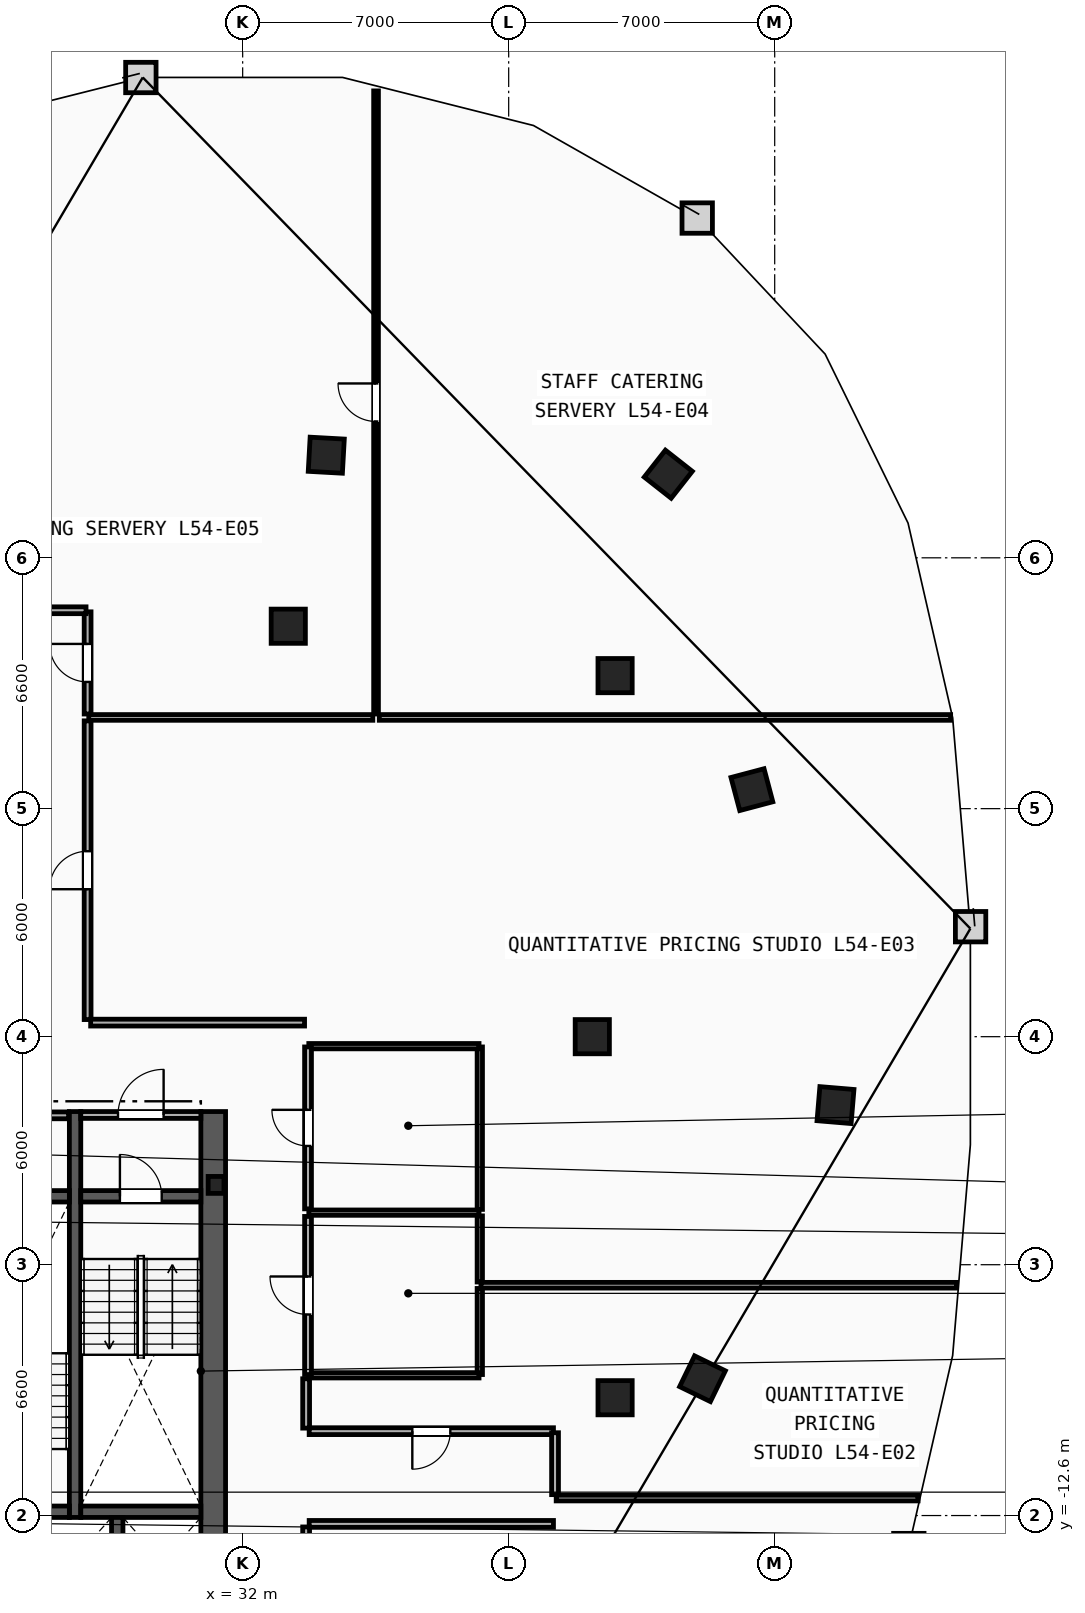
"""IFC4 building model, lengths in metres.
Left out: names, types, materials, properties, quantities, classifications, styles, units other than length and angle.
Written with IfcOpenShell. Run it as: python <this file> out.ifc"""

import sys

from ifc_helpers import new_model, si_unit, direction, frame, frame_2d, origin, origin_2d, place, context, subcontext, project, spatial, rectangle, i_section, extrude, element, fill, save


model = new_model("IFC4")
c1 = context("Model", 3, precision=1e-05, world=origin(), true_north=direction((0.0, 1.0)))
c2 = subcontext(c1, "Body", "Model", "MODEL_VIEW")
j1 = project(units=[si_unit("LENGTHUNIT", "METRE"), si_unit("PLANEANGLEUNIT", "RADIAN")], contexts=[c1])
p1 = place(None, origin())
s1 = spatial("IfcSite", under=j1, at=p1, CompositionType="ELEMENT")
p2 = place(p1, origin())
s2 = spatial("IfcBuilding", under=s1, at=p2, CompositionType="ELEMENT")
p3 = place(p2, frame((0.0, 0.0, 206.2)))
s3 = spatial("IfcBuildingStorey", under=s2, at=p3, CompositionType="ELEMENT", Elevation=206.2)
p4 = place(p3, frame((31.3, -3.9, 0.0), z_axis=(0.0, 0.0, 1.0), x_axis=(1.0, 0.0, 0.0)))
e1 = element("IfcColumn", 1, at=p4, inside=s3, PredefinedType="COLUMN", context=c2, shape_type="SweptSolid", body=[
    extrude(i_section(OverallWidth=0.416, OverallDepth=0.446, WebThickness=0.039, FlangeThickness=0.063, FilletRadius=0.018, at=origin_2d()), origin(), (0.0, 0.0, 1.0), 3.6),
])
for number, where, z_axis, x_axis in (
    (2, (41.2, 0.0, 0.0), (0.0, 0.0, 1.0), (1.0, 0.0, 0.0)),
    (3, (41.8, -9.5, 0.0), (0.0, 0.0, 1.0), (1.0, 0.0, 0.0)),
    (4, (41.8, 9.5, 0.0), (0.0, 0.0, 1.0), (1.0, 0.0, 0.0)),
    (5, (33.2, 10.8, 0.0), (0.0, 0.0, 1.0), (1.0, 0.0, 0.0)),
    (6, (44.1, -9.0, 0.0), (0.0, 0.0, 1.0), (0.437, 0.899, 0.0)),
    (7, (47.6, -1.8, 0.0), (0.0, 0.0, 1.0), (0.084, 0.997, 0.0)),
    (8, (45.4, 6.5, 0.0), (0.0, 0.0, 1.0), (-0.256, 0.967, 0.0)),
    (9, (43.2, 14.8, 0.0), (0.0, 0.0, 1.0), (-0.786, 0.618, 0.0)),
    (10, (34.2, 15.3, 0.0), (0.0, 0.0, 1.0), (-0.998, 0.055, 0.0)),
):
    element("IfcColumn", number, at=place(p3, frame(where, z_axis=z_axis, x_axis=x_axis)), inside=s3, PredefinedType="COLUMN", context=c2, shape_type="SweptSolid", body=[
        extrude(rectangle(XDim=0.9, YDim=0.9, at=origin_2d()), origin(), (0.0, 0.0, 1.0), 3.6),
    ])
p5 = place(p3, frame((31.225, -15.3, 0.0), z_axis=(0.0, 0.0, 1.0), x_axis=(0.0, 1.0, 0.0)))
e11 = element("IfcWall", 11, at=p5, inside=s3, PredefinedType="SHEAR", context=c2, shape_type="SweptSolid", body=[
    extrude(rectangle(XDim=13.33, YDim=0.65, at=frame_2d((6.665, 0.0))), origin(), (0.0, 0.0, 1.0), 3.34),
])
p6 = place(p3, frame((27.59, -12.65, 0.0), z_axis=(0.0, 0.0, 1.0), x_axis=(0.0, 1.0, 0.0)))
e12 = element("IfcWall", 12, at=p6, inside=s3, PredefinedType="SHEAR", context=c2, shape_type="SweptSolid", body=[
    extrude(rectangle(XDim=10.68, YDim=0.3, at=frame_2d((5.34, 0.0))), origin(), (0.0, 0.0, 1.0), 3.34),
])
p7 = place(p3, frame((27.74, -4.2, 0.0), z_axis=(0.0, 0.0, 1.0), x_axis=(1.0, 0.0, 0.0)))
e13 = element("IfcWall", 13, at=p7, inside=s3, PredefinedType="SHEAR", context=c2, shape_type="SweptSolid", body=[
    extrude(rectangle(XDim=3.16, YDim=0.3, at=frame_2d((1.58, 0.0))), origin(), (0.0, 0.0, 1.0), 3.34),
])
p8 = place(p7, frame((1.03, 0.0, 0.0)))
e14 = element("IfcOpeningElement", 14, at=p8, cuts=e13, PredefinedType="OPENING", context=c2, shape_type="SweptSolid", body=[
    extrude(rectangle(XDim=1.1, YDim=2.15, at=frame_2d((0.55, 1.075))), frame((0.0, 0.16, 0.0), z_axis=(0.0, -1.0, 0.0), x_axis=(1.0, 0.0, 0.0)), (0.0, 0.0, 1.0), 0.32),
])
p9 = place(p3, frame((27.74, -12.5, 0.0), z_axis=(0.0, 0.0, 1.0), x_axis=(1.0, 0.0, 0.0)))
e15 = element("IfcWall", 15, at=p9, inside=s3, PredefinedType="SHEAR", context=c2, shape_type="SweptSolid", body=[
    extrude(rectangle(XDim=3.16, YDim=0.3, at=frame_2d((1.58, 0.0))), origin(), (0.0, 0.0, 1.0), 3.34),
])
p10 = place(p3, frame((24.28, -12.5, 0.0), z_axis=(0.0, 0.0, 1.0), x_axis=(1.0, 0.0, 0.0)))
e16 = element("IfcWall", 16, at=p10, inside=s3, PredefinedType="SHEAR", context=c2, shape_type="SweptSolid", body=[
    extrude(rectangle(XDim=3.16, YDim=0.3, at=frame_2d((1.58, 0.0))), origin(), (0.0, 0.0, 1.0), 3.34),
])
p11 = place(p10, frame((1.03, 0.0, 0.0)))
e17 = element("IfcOpeningElement", 17, at=p11, cuts=e16, PredefinedType="OPENING", context=c2, shape_type="SweptSolid", body=[
    extrude(rectangle(XDim=1.1, YDim=2.15, at=frame_2d((0.55, 1.075))), frame((0.0, 0.16, 0.0), z_axis=(0.0, -1.0, 0.0), x_axis=(1.0, 0.0, 0.0)), (0.0, 0.0, 1.0), 0.32),
])
p12 = place(p3, frame((24.28, -4.2, 0.0), z_axis=(0.0, 0.0, 1.0), x_axis=(1.0, 0.0, 0.0)))
e18 = element("IfcWall", 18, at=p12, inside=s3, PredefinedType="SHEAR", context=c2, shape_type="SweptSolid", body=[
    extrude(rectangle(XDim=3.16, YDim=0.3, at=frame_2d((1.58, 0.0))), origin(), (0.0, 0.0, 1.0), 3.34),
])
p13 = place(p3, frame((27.74, -2.06, 0.0), z_axis=(0.0, 0.0, 1.0), x_axis=(1.0, 0.0, 0.0)))
e19 = element("IfcWall", 19, at=p13, inside=s3, PredefinedType="PARTITIONING", context=c2, shape_type="SweptSolid", body=[
    extrude(rectangle(XDim=3.16, YDim=0.18, at=frame_2d((1.58, 0.0))), origin(), (0.0, 0.0, 1.0), 3.34),
])
p14 = place(p13, frame((0.98, 0.0, 0.0)))
e20 = element("IfcOpeningElement", 20, at=p14, cuts=e19, PredefinedType="OPENING", context=c2, shape_type="SweptSolid", body=[
    extrude(rectangle(XDim=1.2, YDim=2.15, at=frame_2d((0.6, 1.075))), frame((0.0, 0.1, 0.0), z_axis=(0.0, -1.0, 0.0), x_axis=(1.0, 0.0, 0.0)), (0.0, 0.0, 1.0), 0.2),
])
p15 = place(p3, frame((28.7, -14.95, 0.0), z_axis=(0.0, 0.0, 1.0), x_axis=(0.0, 1.0, 0.0)))
e21 = element("IfcWall", 21, at=p15, inside=s3, PredefinedType="SHEAR", context=c2, shape_type="SweptSolid", body=[
    extrude(rectangle(XDim=2.3, YDim=0.3, at=frame_2d((1.15, 0.0))), origin(), (0.0, 0.0, 1.0), 3.34),
])
p16 = place(p3, frame((24.3, -2.07, 0.0), z_axis=(0.0, 0.0, 1.0), x_axis=(1.0, 0.0, 0.0)))
e22 = element("IfcWall", 22, at=p16, inside=s3, PredefinedType="PARTITIONING", context=c2, shape_type="SweptSolid", body=[
    extrude(rectangle(XDim=3.12, YDim=0.18, at=frame_2d((1.56, 0.0))), origin(), (0.0, 0.0, 1.0), 3.34),
])
p17 = place(p16, frame((1.085, 0.0, 0.0)))
e23 = element("IfcOpeningElement", 23, at=p17, cuts=e22, PredefinedType="OPENING", context=c2, shape_type="SweptSolid", body=[
    extrude(rectangle(XDim=0.95, YDim=2.1, at=frame_2d((0.475, 1.05))), frame((0.0, 0.1, 0.0), z_axis=(0.0, -1.0, 0.0), x_axis=(1.0, 0.0, 0.0)), (0.0, 0.0, 1.0), 0.2),
])
p18 = place(p3, frame((38.24, -8.89, 0.0), z_axis=(0.0, 0.0, 1.0), x_axis=(0.0, 1.0, 0.0)))
e24 = element("IfcWall", 24, at=p18, inside=s3, PredefinedType="PARTITIONING", context=c2, shape_type="SweptSolid", body=[
    extrude(rectangle(XDim=2.265, YDim=0.14, at=frame_2d((1.132, 0.0))), origin(), (0.0, 0.0, 1.0), 3.34),
])
p19 = place(p3, frame((38.24, -6.455, 0.0), z_axis=(0.0, 0.0, 1.0), x_axis=(0.0, 1.0, 0.0)))
e25 = element("IfcWall", 25, at=p19, inside=s3, PredefinedType="PARTITIONING", context=c2, shape_type="SweptSolid", body=[
    extrude(rectangle(XDim=1.74, YDim=0.14, at=frame_2d((0.87, 0.0))), origin(), (0.0, 0.0, 1.0), 3.34),
])
p20 = place(p3, frame((38.24, -4.545, 0.0), z_axis=(0.0, 0.0, 1.0), x_axis=(0.0, 1.0, 0.0)))
e26 = element("IfcWall", 26, at=p20, inside=s3, PredefinedType="PARTITIONING", context=c2, shape_type="SweptSolid", body=[
    extrude(rectangle(XDim=4.275, YDim=0.14, at=frame_2d((2.137, 0.0))), origin(), (0.0, 0.0, 1.0), 3.34),
])
for number, where, z_axis, x_axis in (
    (27, (33.74, -0.25, 0.0), (0.0, 0.0, 1.0), (1.0, 0.0, 0.0)),
    (28, (33.74, -4.63, 0.0), (0.0, 0.0, 1.0), (1.0, 0.0, 0.0)),
    (29, (33.74, -8.91, 0.0), (0.0, 0.0, 1.0), (1.0, 0.0, 0.0)),
):
    element("IfcWall", number, at=place(p3, frame(where, z_axis=z_axis, x_axis=x_axis)), inside=s3, PredefinedType="PARTITIONING", context=c2, shape_type="SweptSolid", body=[
        extrude(rectangle(XDim=4.48, YDim=0.14, at=frame_2d((2.24, 0.0))), origin(), (0.0, 0.0, 1.0), 3.34),
    ])
p21 = place(p3, frame((33.72, -4.53, 0.0), z_axis=(0.0, 0.0, 1.0), x_axis=(0.0, 1.0, 0.0)))
e30 = element("IfcWall", 30, at=p21, inside=s3, PredefinedType="PARTITIONING", context=c2, shape_type="SweptSolid", body=[
    extrude(rectangle(XDim=4.26, YDim=0.18, at=frame_2d((2.13, 0.0))), origin(), (0.0, 0.0, 1.0), 3.34),
])
p22 = place(p21, frame((1.655, 0.0, 0.0)))
e31 = element("IfcOpeningElement", 31, at=p22, cuts=e30, PredefinedType="OPENING", context=c2, shape_type="SweptSolid", body=[
    extrude(rectangle(XDim=0.95, YDim=2.1, at=frame_2d((0.475, 1.05))), frame((0.0, 0.1, 0.0), z_axis=(0.0, -1.0, 0.0), x_axis=(1.0, 0.0, 0.0)), (0.0, 0.0, 1.0), 0.2),
])
p23 = place(p3, frame((33.72, -8.89, 0.0), z_axis=(0.0, 0.0, 1.0), x_axis=(0.0, 1.0, 0.0)))
e32 = element("IfcWall", 32, at=p23, inside=s3, PredefinedType="PARTITIONING", context=c2, shape_type="SweptSolid", body=[
    extrude(rectangle(XDim=4.16, YDim=0.18, at=frame_2d((2.08, 0.0))), origin(), (0.0, 0.0, 1.0), 3.34),
])
p24 = place(p23, frame((1.58, 0.0, 0.0)))
e33 = element("IfcOpeningElement", 33, at=p24, cuts=e32, PredefinedType="OPENING", context=c2, shape_type="SweptSolid", body=[
    extrude(rectangle(XDim=1.0, YDim=2.15, at=frame_2d((0.5, 1.075))), frame((0.0, 0.1, 0.0), z_axis=(0.0, -1.0, 0.0), x_axis=(1.0, 0.0, 0.0)), (0.0, 0.0, 1.0), 0.2),
])
p25 = place(p3, frame((27.95, 8.4, 0.0), z_axis=(0.0, 0.0, 1.0), x_axis=(1.0, 0.0, 0.0)))
e34 = element("IfcWall", 34, at=p25, inside=s3, PredefinedType="PARTITIONING", context=c2, shape_type="SweptSolid", body=[
    extrude(rectangle(XDim=7.475, YDim=0.15, at=frame_2d((3.738, 0.0))), origin(), (0.0, 0.0, 1.0), 3.34),
])
p26 = place(p3, frame((35.595, 8.4, 0.0), z_axis=(0.0, 0.0, 1.0), x_axis=(1.0, 0.0, 0.0)))
e35 = element("IfcWall", 35, at=p26, inside=s3, PredefinedType="PARTITIONING", context=c2, shape_type="SweptSolid", body=[
    extrude(rectangle(XDim=15.035, YDim=0.15, at=frame_2d((7.517, 0.0))), origin(), (0.0, 0.0, 1.0), 3.34),
])
p27 = place(p3, frame((38.27, -6.54, 0.0), z_axis=(0.0, 0.0, 1.0), x_axis=(1.0, 0.0, 0.0)))
e36 = element("IfcWall", 36, at=p27, inside=s3, PredefinedType="PARTITIONING", context=c2, shape_type="SweptSolid", body=[
    extrude(rectangle(XDim=12.518, YDim=0.15, at=frame_2d((6.259, 0.0))), origin(), (0.0, 0.0, 1.0), 3.34),
])
p28 = place(p3, frame((40.25, -12.14, 0.0), z_axis=(0.0, 0.0, 1.0), x_axis=(1.0, 0.0, 0.0)))
e37 = element("IfcWall", 37, at=p28, inside=s3, PredefinedType="PARTITIONING", context=c2, shape_type="SweptSolid", body=[
    extrude(rectangle(XDim=9.523, YDim=0.15, at=frame_2d((4.761, 0.0))), origin(), (0.0, 0.0, 1.0), 3.34),
])
p29 = place(p3, frame((33.75, -12.82, 0.0), z_axis=(0.0, 0.0, 1.0), x_axis=(1.0, 0.0, 0.0)))
e38 = element("IfcWall", 38, at=p29, inside=s3, PredefinedType="PARTITIONING", context=c2, shape_type="SweptSolid", body=[
    extrude(rectangle(XDim=6.428, YDim=0.18, at=frame_2d((3.214, 0.0))), origin(), (0.0, 0.0, 1.0), 3.34),
])
p30 = place(p3, frame((33.67, -17.428, 0.0), z_axis=(0.0, 0.0, 1.0), x_axis=(0.0, 1.0, 0.0)))
e39 = element("IfcWall", 39, at=p30, inside=s3, PredefinedType="PARTITIONING", context=c2, shape_type="SweptSolid", body=[
    extrude(rectangle(XDim=4.529, YDim=0.18, at=frame_2d((2.264, 0.0))), origin(), (0.0, 0.0, 1.0), 3.34),
])
p31 = place(p3, frame((40.178, -10.38, 0.0), z_axis=(0.0, 0.0, 1.0), x_axis=(-1.0, 0.0, 0.0)))
e40 = element("IfcWall", 40, at=p31, inside=s3, PredefinedType="PARTITIONING", context=c2, shape_type="SweptSolid", body=[
    extrude(rectangle(XDim=6.428, YDim=0.18, at=frame_2d((3.214, 0.0))), origin(), (0.0, 0.0, 1.0), 3.34),
])
p32 = place(p31, frame((2.714, 0.0, 0.0)))
e41 = element("IfcOpeningElement", 41, at=p32, cuts=e40, PredefinedType="OPENING", context=c2, shape_type="SweptSolid", body=[
    extrude(rectangle(XDim=1.0, YDim=2.15, at=frame_2d((0.5, 1.075))), frame((0.0, 0.1, 0.0), z_axis=(0.0, -1.0, 0.0), x_axis=(1.0, 0.0, 0.0)), (0.0, 0.0, 1.0), 0.2),
])
p33 = place(p3, frame((40.22, -12.05, 0.0), z_axis=(0.0, 0.0, 1.0), x_axis=(0.0, 1.0, 0.0)))
e42 = element("IfcWall", 42, at=p33, inside=s3, PredefinedType="PARTITIONING", context=c2, shape_type="SweptSolid", body=[
    extrude(rectangle(XDim=1.629, YDim=0.18, at=frame_2d((0.814, 0.0))), origin(), (0.0, 0.0, 1.0), 3.34),
])
p34 = place(p3, frame((33.67, -10.3, 0.0), z_axis=(0.0, 0.0, 1.0), x_axis=(0.0, 1.0, 0.0)))
e43 = element("IfcWall", 43, at=p34, inside=s3, PredefinedType="PARTITIONING", context=c2, shape_type="SweptSolid", body=[
    extrude(rectangle(XDim=1.299, YDim=0.18, at=frame_2d((0.649, 0.0))), origin(), (0.0, 0.0, 1.0), 3.34),
])
p35 = place(p3, frame((27.92, 0.45, 0.0), z_axis=(0.0, 0.0, 1.0), x_axis=(0.0, 1.0, 0.0)))
e44 = element("IfcWall", 44, at=p35, inside=s3, PredefinedType="PARTITIONING", context=c2, shape_type="SweptSolid", body=[
    extrude(rectangle(XDim=7.86, YDim=0.18, at=frame_2d((3.93, 0.0))), origin(), (0.0, 0.0, 1.0), 3.34),
])
p36 = place(p35, frame((3.43, 0.0, 0.0)))
e45 = element("IfcOpeningElement", 45, at=p36, cuts=e44, PredefinedType="OPENING", context=c2, shape_type="SweptSolid", body=[
    extrude(rectangle(XDim=1.0, YDim=2.15, at=frame_2d((0.5, 1.075))), frame((0.0, 0.1, 0.0), z_axis=(0.0, -1.0, 0.0), x_axis=(1.0, 0.0, 0.0)), (0.0, 0.0, 1.0), 0.2),
])
p37 = place(p3, frame((33.628, 0.37, 0.0), z_axis=(0.0, 0.0, 1.0), x_axis=(-1.0, 0.0, 0.0)))
e46 = element("IfcWall", 46, at=p37, inside=s3, PredefinedType="PARTITIONING", context=c2, shape_type="SweptSolid", body=[
    extrude(rectangle(XDim=5.628, YDim=0.18, at=frame_2d((2.814, 0.0))), origin(), (0.0, 0.0, 1.0), 3.34),
])
p38 = place(p3, frame((27.92, 8.49, 0.0), z_axis=(0.0, 0.0, 1.0), x_axis=(0.0, 1.0, 0.0)))
e47 = element("IfcWall", 47, at=p38, inside=s3, PredefinedType="PARTITIONING", context=c2, shape_type="SweptSolid", body=[
    extrude(rectangle(XDim=2.688, YDim=0.18, at=frame_2d((1.344, 0.0))), origin(), (0.0, 0.0, 1.0), 3.34),
])
p39 = place(p38, frame((0.844, 0.0, 0.0)))
e48 = element("IfcOpeningElement", 48, at=p39, cuts=e47, PredefinedType="OPENING", context=c2, shape_type="SweptSolid", body=[
    extrude(rectangle(XDim=1.0, YDim=2.15, at=frame_2d((0.5, 1.075))), frame((0.0, 0.1, 0.0), z_axis=(0.0, -1.0, 0.0), x_axis=(1.0, 0.0, 0.0)), (0.0, 0.0, 1.0), 0.2),
])
p40 = place(p3, frame((27.878, 11.22, 0.0), z_axis=(0.0, 0.0, 1.0), x_axis=(-1.0, 0.0, 0.0)))
e49 = element("IfcWall", 49, at=p40, inside=s3, PredefinedType="PARTITIONING", context=c2, shape_type="SweptSolid", body=[
    extrude(rectangle(XDim=2.357, YDim=0.18, at=frame_2d((1.178, 0.0))), origin(), (0.0, 0.0, 1.0), 3.34),
])
p41 = place(p3, frame((35.51, 8.49, 0.0), z_axis=(0.0, 0.0, 1.0), x_axis=(0.0, 1.0, 0.0)))
e50 = element("IfcWall", 50, at=p41, inside=s3, PredefinedType="PARTITIONING", context=c2, shape_type="SweptSolid", body=[
    extrude(rectangle(XDim=16.396, YDim=0.125, at=frame_2d((8.198, 0.0))), origin(), (0.0, 0.0, 1.0), 3.34),
])
p42 = place(p41, frame((7.698, 0.0, 0.0)))
e51 = element("IfcOpeningElement", 51, at=p42, cuts=e50, PredefinedType="OPENING", context=c2, shape_type="SweptSolid", body=[
    extrude(rectangle(XDim=1.0, YDim=2.15, at=frame_2d((0.5, 1.075))), frame((0.0, 0.073, 0.0), z_axis=(0.0, -1.0, 0.0), x_axis=(1.0, 0.0, 0.0)), (0.0, 0.0, 1.0), 0.145),
])
p43 = place(p8, origin())
e52 = element("IfcDoor", 52, at=p43, inside=s3, OperationType="SINGLE_SWING_LEFT", PredefinedType="DOOR", context=c2, shape_type="SweptSolid", body=[
    extrude(rectangle(XDim=1.1, YDim=2.15, at=frame_2d((0.55, 1.075))), frame((0.0, 0.025, 0.0), z_axis=(0.0, -1.0, 0.0), x_axis=(1.0, 0.0, 0.0)), (0.0, 0.0, 1.0), 0.05),
])
fill(e14, e52)
p44 = place(p14, origin())
e53 = element("IfcDoor", 53, at=p44, inside=s3, OperationType="SINGLE_SWING_RIGHT", PredefinedType="DOOR", context=c2, shape_type="SweptSolid", body=[
    extrude(rectangle(XDim=1.2, YDim=2.15, at=frame_2d((0.6, 1.075))), frame((0.0, 0.025, 0.0), z_axis=(0.0, -1.0, 0.0), x_axis=(1.0, 0.0, 0.0)), (0.0, 0.0, 1.0), 0.05),
])
fill(e20, e53)
p45 = place(p42, origin())
e54 = element("IfcDoor", 54, at=p45, inside=s3, OperationType="SINGLE_SWING_RIGHT", PredefinedType="DOOR", context=c2, shape_type="SweptSolid", body=[
    extrude(rectangle(XDim=1.0, YDim=2.15, at=frame_2d((0.5, 1.075))), frame((0.0, 0.025, 0.0), z_axis=(0.0, -1.0, 0.0), x_axis=(1.0, 0.0, 0.0)), (0.0, 0.0, 1.0), 0.05),
])
fill(e51, e54)
p46 = place(p36, origin())
e55 = element("IfcDoor", 55, at=p46, inside=s3, OperationType="SINGLE_SWING_LEFT", PredefinedType="DOOR", context=c2, shape_type="SweptSolid", body=[
    extrude(rectangle(XDim=1.0, YDim=2.15, at=frame_2d((0.5, 1.075))), frame((0.0, 0.025, 0.0), z_axis=(0.0, -1.0, 0.0), x_axis=(1.0, 0.0, 0.0)), (0.0, 0.0, 1.0), 0.05),
])
fill(e45, e55)
p47 = place(p32, origin())
e56 = element("IfcDoor", 56, at=p47, inside=s3, OperationType="SINGLE_SWING_RIGHT", PredefinedType="DOOR", context=c2, shape_type="SweptSolid", body=[
    extrude(rectangle(XDim=1.0, YDim=2.15, at=frame_2d((0.5, 1.075))), frame((0.0, 0.025, 0.0), z_axis=(0.0, -1.0, 0.0), x_axis=(1.0, 0.0, 0.0)), (0.0, 0.0, 1.0), 0.05),
])
fill(e41, e56)
p48 = place(p22, origin())
e57 = element("IfcDoor", 57, at=p48, inside=s3, OperationType="SINGLE_SWING_RIGHT", PredefinedType="DOOR", context=c2, shape_type="SweptSolid", body=[
    extrude(rectangle(XDim=0.95, YDim=2.1, at=frame_2d((0.475, 1.05))), frame((0.0, 0.025, 0.0), z_axis=(0.0, -1.0, 0.0), x_axis=(1.0, 0.0, 0.0)), (0.0, 0.0, 1.0), 0.05),
])
fill(e31, e57)
p49 = place(p24, origin())
e58 = element("IfcDoor", 58, at=p49, inside=s3, OperationType="SINGLE_SWING_RIGHT", PredefinedType="DOOR", context=c2, shape_type="SweptSolid", body=[
    extrude(rectangle(XDim=1.0, YDim=2.15, at=frame_2d((0.5, 1.075))), frame((0.0, 0.025, 0.0), z_axis=(0.0, -1.0, 0.0), x_axis=(1.0, 0.0, 0.0)), (0.0, 0.0, 1.0), 0.05),
])
fill(e33, e58)
p50 = place(p39, origin())
e59 = element("IfcDoor", 59, at=p50, inside=s3, OperationType="SINGLE_SWING_RIGHT", PredefinedType="DOOR", context=c2, shape_type="SweptSolid", body=[
    extrude(rectangle(XDim=1.0, YDim=2.15, at=frame_2d((0.5, 1.075))), frame((0.0, 0.025, 0.0), z_axis=(0.0, -1.0, 0.0), x_axis=(1.0, 0.0, 0.0)), (0.0, 0.0, 1.0), 0.05),
])
fill(e48, e59)
save(model, sys.argv[1])
